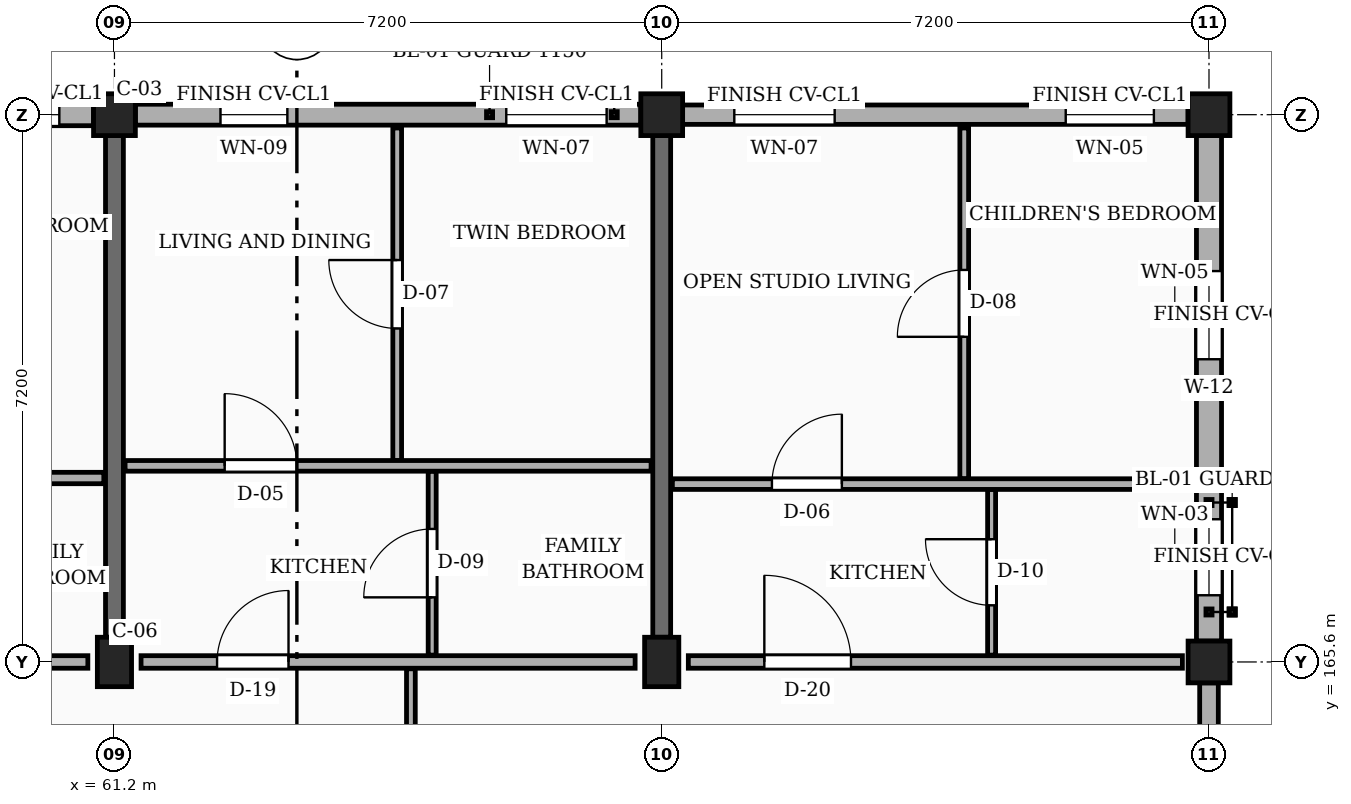
"""IFC4 building model, lengths in metres.
Left out: names, types, materials, properties, quantities, classifications, styles, units other than length and angle.
Written with IfcOpenShell. Run it as: python <this file> out.ifc"""

import sys

from ifc_helpers import new_model, si_unit, direction, frame, frame_2d, origin, origin_2d, place, context, subcontext, project, spatial, rectangle, extrude, element, fill, save


model = new_model("IFC4")
c1 = context("Model", 3, precision=1e-05, world=origin(), true_north=direction((0.0, 1.0)))
c2 = subcontext(c1, "Body", "Model", "MODEL_VIEW")
j1 = project(units=[si_unit("LENGTHUNIT", "METRE"), si_unit("PLANEANGLEUNIT", "RADIAN")], contexts=[c1])
p1 = place(None, origin())
s1 = spatial("IfcSite", under=j1, at=p1, CompositionType="ELEMENT")
p2 = place(p1, origin())
s2 = spatial("IfcBuilding", under=s1, at=p2, CompositionType="ELEMENT")
p3 = place(p2, frame((0.0, 0.0, 13.95)))
s3 = spatial("IfcBuildingStorey", under=s2, at=p3, CompositionType="ELEMENT", Elevation=13.95)
p4 = place(p3, frame((61.2, 165.6, 0.0), z_axis=(0.0, 0.0, 1.0), x_axis=(1.0, 0.0, 0.0)))
e1 = element("IfcColumn", 1, at=p4, inside=s3, PredefinedType="COLUMN", context=c2, shape_type="SweptSolid", body=[
    extrude(rectangle(XDim=0.45, YDim=0.65, at=origin_2d()), origin(), (0.0, 0.0, 1.0), 3.15),
])
p5 = place(p3, frame((61.2, 172.8, 0.0), z_axis=(0.0, 0.0, 1.0), x_axis=(1.0, 0.0, 0.0)))
e2 = element("IfcColumn", 2, at=p5, inside=s3, PredefinedType="COLUMN", context=c2, shape_type="SweptSolid", body=[
    extrude(rectangle(XDim=0.55, YDim=0.55, at=origin_2d()), origin(), (0.0, 0.0, 1.0), 3.15),
])
p6 = place(p3, frame((68.4, 165.6, 0.0), z_axis=(0.0, 0.0, 1.0), x_axis=(1.0, 0.0, 0.0)))
e3 = element("IfcColumn", 3, at=p6, inside=s3, PredefinedType="COLUMN", context=c2, shape_type="SweptSolid", body=[
    extrude(rectangle(XDim=0.45, YDim=0.65, at=origin_2d()), origin(), (0.0, 0.0, 1.0), 3.15),
])
for number, where, z_axis, x_axis in (
    (4, (68.4, 172.8, 0.0), (0.0, 0.0, 1.0), (1.0, 0.0, 0.0)),
    (5, (75.6, 165.6, 0.0), (0.0, 0.0, 1.0), (1.0, 0.0, 0.0)),
    (6, (75.6, 172.8, 0.0), (0.0, 0.0, 1.0), (1.0, 0.0, 0.0)),
):
    element("IfcColumn", number, at=place(p3, frame(where, z_axis=z_axis, x_axis=x_axis)), inside=s3, PredefinedType="COLUMN", context=c2, shape_type="SweptSolid", body=[
        extrude(rectangle(XDim=0.55, YDim=0.55, at=origin_2d()), origin(), (0.0, 0.0, 1.0), 3.15),
    ])
for number, where, z_axis, x_axis in (
    (7, (61.2, 165.925, 0.0), (0.0, 0.0, 1.0), (0.0, 1.0, 0.0)),
    (8, (68.4, 165.925, 0.0), (0.0, 0.0, 1.0), (0.0, 1.0, 0.0)),
):
    element("IfcWall", number, at=place(p3, frame(where, z_axis=z_axis, x_axis=x_axis)), inside=s3, PredefinedType="SOLIDWALL", context=c2, shape_type="SweptSolid", body=[
        extrude(rectangle(XDim=6.6, YDim=0.235, at=frame_2d((3.3, 0.0))), origin(), (0.0, 0.0, 1.0), 2.185),
    ])
p7 = place(p3, frame((75.6, 158.675, 0.0), z_axis=(0.0, 0.0, 1.0), x_axis=(0.0, 1.0, 0.0)))
e9 = element("IfcWall", 9, at=p7, inside=s3, PredefinedType="SOLIDWALL", context=c2, shape_type="SweptSolid", body=[
    extrude(rectangle(XDim=6.65, YDim=0.245, at=frame_2d((3.325, 0.0))), origin(), (0.0, 0.0, 1.0), 2.455),
])
p8 = place(p7, frame((0.45, 0.0, 0.78)))
e10 = element("IfcOpeningElement", 10, at=p8, cuts=e9, PredefinedType="OPENING", context=c2, shape_type="SweptSolid", body=[
    extrude(rectangle(XDim=0.85, YDim=1.15, at=frame_2d((0.425, 0.575))), frame((0.0, 0.133, 0.0), z_axis=(0.0, -1.0, 0.0), x_axis=(1.0, 0.0, 0.0)), (0.0, 0.0, 1.0), 0.265),
])
p9 = place(p7, frame((4.65, 0.0, 0.78)))
e11 = element("IfcOpeningElement", 11, at=p9, cuts=e9, PredefinedType="OPENING", context=c2, shape_type="SweptSolid", body=[
    extrude(rectangle(XDim=1.0, YDim=1.15, at=frame_2d((0.5, 0.575))), frame((0.0, 0.133, 0.0), z_axis=(0.0, -1.0, 0.0), x_axis=(1.0, 0.0, 0.0)), (0.0, 0.0, 1.0), 0.265),
])
p10 = place(p3, frame((75.6, 165.875, 0.0), z_axis=(0.0, 0.0, 1.0), x_axis=(0.0, 1.0, 0.0)))
e12 = element("IfcWall", 12, at=p10, inside=s3, PredefinedType="SOLIDWALL", context=c2, shape_type="SweptSolid", body=[
    extrude(rectangle(XDim=6.65, YDim=0.33, at=frame_2d((3.325, 0.0))), origin(), (0.0, 0.0, 1.0), 2.455),
])
p11 = place(p10, frame((0.603, 0.0, 0.78)))
e13 = element("IfcOpeningElement", 13, at=p11, cuts=e12, PredefinedType="OPENING", context=c2, shape_type="SweptSolid", body=[
    extrude(rectangle(XDim=1.0, YDim=1.15, at=frame_2d((0.5, 0.575))), frame((0.0, 0.175, 0.0), z_axis=(0.0, -1.0, 0.0), x_axis=(1.0, 0.0, 0.0)), (0.0, 0.0, 1.0), 0.35),
])
p12 = place(p10, frame((3.708, 0.0, 0.78)))
e14 = element("IfcOpeningElement", 14, at=p12, cuts=e12, PredefinedType="OPENING", context=c2, shape_type="SweptSolid", body=[
    extrude(rectangle(XDim=1.16, YDim=1.15, at=frame_2d((0.58, 0.575))), frame((0.0, 0.175, 0.0), z_axis=(0.0, -1.0, 0.0), x_axis=(1.0, 0.0, 0.0)), (0.0, 0.0, 1.0), 0.35),
])
p13 = place(p3, frame((75.325, 172.8, 0.0), z_axis=(0.0, 0.0, 1.0), x_axis=(-1.0, 0.0, 0.0)))
e15 = element("IfcWall", 15, at=p13, inside=s3, PredefinedType="SOLIDWALL", context=c2, shape_type="SweptSolid", body=[
    extrude(rectangle(XDim=6.65, YDim=0.255, at=frame_2d((3.325, 0.0))), origin(), (0.0, 0.0, 1.0), 2.455),
])
p14 = place(p13, frame((0.45, 0.0, 0.78)))
e16 = element("IfcOpeningElement", 16, at=p14, cuts=e15, PredefinedType="OPENING", context=c2, shape_type="SweptSolid", body=[
    extrude(rectangle(XDim=1.16, YDim=1.15, at=frame_2d((0.58, 0.575))), frame((0.0, 0.137, 0.0), z_axis=(0.0, -1.0, 0.0), x_axis=(1.0, 0.0, 0.0)), (0.0, 0.0, 1.0), 0.275),
])
p15 = place(p13, frame((4.65, 0.0, 0.78)))
e17 = element("IfcOpeningElement", 17, at=p15, cuts=e15, PredefinedType="OPENING", context=c2, shape_type="SweptSolid", body=[
    extrude(rectangle(XDim=1.32, YDim=1.15, at=frame_2d((0.66, 0.575))), frame((0.0, 0.137, 0.0), z_axis=(0.0, -1.0, 0.0), x_axis=(1.0, 0.0, 0.0)), (0.0, 0.0, 1.0), 0.275),
])
p16 = place(p3, frame((68.125, 172.8, 0.0), z_axis=(0.0, 0.0, 1.0), x_axis=(-1.0, 0.0, 0.0)))
e18 = element("IfcWall", 18, at=p16, inside=s3, PredefinedType="SOLIDWALL", context=c2, shape_type="SweptSolid", body=[
    extrude(rectangle(XDim=6.65, YDim=0.275, at=frame_2d((3.325, 0.0))), origin(), (0.0, 0.0, 1.0), 2.455),
])
p17 = place(p16, frame((0.45, 0.0, 0.78)))
e19 = element("IfcOpeningElement", 19, at=p17, cuts=e18, PredefinedType="OPENING", context=c2, shape_type="SweptSolid", body=[
    extrude(rectangle(XDim=1.32, YDim=1.15, at=frame_2d((0.66, 0.575))), frame((0.0, 0.147, 0.0), z_axis=(0.0, -1.0, 0.0), x_axis=(1.0, 0.0, 0.0)), (0.0, 0.0, 1.0), 0.295),
])
p18 = place(p16, frame((4.65, 0.0, 0.78)))
e20 = element("IfcOpeningElement", 20, at=p18, cuts=e18, PredefinedType="OPENING", context=c2, shape_type="SweptSolid", body=[
    extrude(rectangle(XDim=0.88, YDim=1.26, at=frame_2d((0.44, 0.63))), frame((0.0, 0.147, 0.0), z_axis=(0.0, -1.0, 0.0), x_axis=(1.0, 0.0, 0.0)), (0.0, 0.0, 1.0), 0.295),
])
p19 = place(p3, frame((60.925, 172.8, 0.0), z_axis=(0.0, 0.0, 1.0), x_axis=(-1.0, 0.0, 0.0)))
e21 = element("IfcWall", 21, at=p19, inside=s3, PredefinedType="SOLIDWALL", context=c2, shape_type="SweptSolid", body=[
    extrude(rectangle(XDim=6.65, YDim=0.29, at=frame_2d((3.325, 0.0))), origin(), (0.0, 0.0, 1.0), 2.455),
])
p20 = place(p19, frame((0.45, 0.0, 0.78)))
e22 = element("IfcOpeningElement", 22, at=p20, cuts=e21, PredefinedType="OPENING", context=c2, shape_type="SweptSolid", body=[
    extrude(rectangle(XDim=0.88, YDim=1.26, at=frame_2d((0.44, 0.63))), frame((0.0, 0.155, 0.0), z_axis=(0.0, -1.0, 0.0), x_axis=(1.0, 0.0, 0.0)), (0.0, 0.0, 1.0), 0.31),
])
p21 = place(p19, frame((4.65, 0.0, 0.78)))
e23 = element("IfcOpeningElement", 23, at=p21, cuts=e21, PredefinedType="OPENING", context=c2, shape_type="SweptSolid", body=[
    extrude(rectangle(XDim=1.04, YDim=1.26, at=frame_2d((0.52, 0.63))), frame((0.0, 0.155, 0.0), z_axis=(0.0, -1.0, 0.0), x_axis=(1.0, 0.0, 0.0)), (0.0, 0.0, 1.0), 0.31),
])
p22 = place(p3, frame((54.35, 165.6, 0.0), z_axis=(0.0, 0.0, 1.0), x_axis=(1.0, 0.0, 0.0)))
e24 = element("IfcWall", 24, at=p22, inside=s3, PredefinedType="PARTITIONING", context=c2, shape_type="SweptSolid", body=[
    extrude(rectangle(XDim=6.5, YDim=0.165, at=frame_2d((3.25, 0.0))), origin(), (0.0, 0.0, 1.0), 2.235),
])
p23 = place(p22, frame((1.0, 0.0, 0.0)))
e25 = element("IfcOpeningElement", 25, at=p23, cuts=e24, PredefinedType="OPENING", context=c2, shape_type="SweptSolid", body=[
    extrude(rectangle(XDim=1.0, YDim=2.15, at=frame_2d((0.5, 1.075))), frame((0.0, 0.093, 0.0), z_axis=(0.0, -1.0, 0.0), x_axis=(1.0, 0.0, 0.0)), (0.0, 0.0, 1.0), 0.185),
])
p24 = place(p3, frame((61.55, 165.6, 0.0), z_axis=(0.0, 0.0, 1.0), x_axis=(1.0, 0.0, 0.0)))
e26 = element("IfcWall", 26, at=p24, inside=s3, PredefinedType="PARTITIONING", context=c2, shape_type="SweptSolid", body=[
    extrude(rectangle(XDim=6.5, YDim=0.165, at=frame_2d((3.25, 0.0))), origin(), (0.0, 0.0, 1.0), 2.235),
])
p25 = place(p24, frame((1.0, 0.0, 0.0)))
e27 = element("IfcOpeningElement", 27, at=p25, cuts=e26, PredefinedType="OPENING", context=c2, shape_type="SweptSolid", body=[
    extrude(rectangle(XDim=0.94, YDim=2.12, at=frame_2d((0.47, 1.06))), frame((0.0, 0.093, 0.0), z_axis=(0.0, -1.0, 0.0), x_axis=(1.0, 0.0, 0.0)), (0.0, 0.0, 1.0), 0.185),
])
p26 = place(p3, frame((68.75, 165.6, 0.0), z_axis=(0.0, 0.0, 1.0), x_axis=(1.0, 0.0, 0.0)))
e28 = element("IfcWall", 28, at=p26, inside=s3, PredefinedType="PARTITIONING", context=c2, shape_type="SweptSolid", body=[
    extrude(rectangle(XDim=6.5, YDim=0.165, at=frame_2d((3.25, 0.0))), origin(), (0.0, 0.0, 1.0), 2.235),
])
p27 = place(p26, frame((1.0, 0.0, 0.0)))
e29 = element("IfcOpeningElement", 29, at=p27, cuts=e28, PredefinedType="OPENING", context=c2, shape_type="SweptSolid", body=[
    extrude(rectangle(XDim=1.14, YDim=2.18, at=frame_2d((0.57, 1.09))), frame((0.0, 0.093, 0.0), z_axis=(0.0, -1.0, 0.0), x_axis=(1.0, 0.0, 0.0)), (0.0, 0.0, 1.0), 0.185),
])
p28 = place(p3, frame((54.14, 168.02, 0.0), z_axis=(0.0, 0.0, 1.0), x_axis=(1.0, 0.0, 0.0)))
e30 = element("IfcWall", 30, at=p28, inside=s3, PredefinedType="PARTITIONING", context=c2, shape_type="SweptSolid", body=[
    extrude(rectangle(XDim=6.92, YDim=0.15, at=frame_2d((3.46, 0.0))), origin(), (0.0, 0.0, 1.0), 2.32),
])
p29 = place(p28, frame((1.31, 0.0, 0.0)))
e31 = element("IfcOpeningElement", 31, at=p29, cuts=e30, PredefinedType="OPENING", context=c2, shape_type="SweptSolid", body=[
    extrude(rectangle(XDim=0.92, YDim=2.1, at=frame_2d((0.46, 1.05))), frame((0.0, 0.085, 0.0), z_axis=(0.0, -1.0, 0.0), x_axis=(1.0, 0.0, 0.0)), (0.0, 0.0, 1.0), 0.17),
])
p30 = place(p3, frame((65.1, 158.49, 0.0), z_axis=(0.0, 0.0, 1.0), x_axis=(0.0, 1.0, 0.0)))
e32 = element("IfcWall", 32, at=p30, inside=s3, PredefinedType="PARTITIONING", context=c2, shape_type="SweptSolid", body=[
    extrude(rectangle(XDim=7.02, YDim=0.115, at=frame_2d((3.51, 0.0))), origin(), (0.0, 0.0, 1.0), 2.32),
])
p31 = place(p30, frame((2.85, 0.0, 0.0)))
e33 = element("IfcOpeningElement", 33, at=p31, cuts=e32, PredefinedType="OPENING", context=c2, shape_type="SweptSolid", body=[
    extrude(rectangle(XDim=1.02, YDim=2.15, at=frame_2d((0.51, 1.075))), frame((0.0, 0.067, 0.0), z_axis=(0.0, -1.0, 0.0), x_axis=(1.0, 0.0, 0.0)), (0.0, 0.0, 1.0), 0.135),
])
p32 = place(p3, frame((64.92, 168.25, 0.0), z_axis=(0.0, 0.0, 1.0), x_axis=(0.0, 1.0, 0.0)))
e34 = element("IfcWall", 34, at=p32, inside=s3, PredefinedType="PARTITIONING", context=c2, shape_type="SweptSolid", body=[
    extrude(rectangle(XDim=4.375, YDim=0.115, at=frame_2d((2.188, 0.0))), origin(), (0.0, 0.0, 1.0), 2.32),
])
p33 = place(p32, frame((1.738, 0.0, 0.0)))
e35 = element("IfcOpeningElement", 35, at=p33, cuts=e34, PredefinedType="OPENING", context=c2, shape_type="SweptSolid", body=[
    extrude(rectangle(XDim=0.9, YDim=2.1, at=frame_2d((0.45, 1.05))), frame((0.0, 0.067, 0.0), z_axis=(0.0, -1.0, 0.0), x_axis=(1.0, 0.0, 0.0)), (0.0, 0.0, 1.0), 0.135),
])
p34 = place(p3, frame((65.38, 165.69, 0.0), z_axis=(0.0, 0.0, 1.0), x_axis=(0.0, 1.0, 0.0)))
e36 = element("IfcWall", 36, at=p34, inside=s3, PredefinedType="PARTITIONING", context=c2, shape_type="SweptSolid", body=[
    extrude(rectangle(XDim=2.42, YDim=0.105, at=frame_2d((1.21, 0.0))), origin(), (0.0, 0.0, 1.0), 2.32),
])
p35 = place(p34, frame((0.76, 0.0, 0.0)))
e37 = element("IfcOpeningElement", 37, at=p35, cuts=e36, PredefinedType="OPENING", context=c2, shape_type="SweptSolid", body=[
    extrude(rectangle(XDim=0.9, YDim=2.05, at=frame_2d((0.45, 1.025))), frame((0.0, 0.062, 0.0), z_axis=(0.0, -1.0, 0.0), x_axis=(1.0, 0.0, 0.0)), (0.0, 0.0, 1.0), 0.125),
])
p36 = place(p3, frame((61.34, 168.18, 0.0), z_axis=(0.0, 0.0, 1.0), x_axis=(1.0, 0.0, 0.0)))
e38 = element("IfcWall", 38, at=p36, inside=s3, PredefinedType="PARTITIONING", context=c2, shape_type="SweptSolid", body=[
    extrude(rectangle(XDim=6.92, YDim=0.14, at=frame_2d((3.46, 0.0))), origin(), (0.0, 0.0, 1.0), 2.32),
])
p37 = place(p36, frame((1.31, 0.0, 0.0)))
e39 = element("IfcOpeningElement", 39, at=p37, cuts=e38, PredefinedType="OPENING", context=c2, shape_type="SweptSolid", body=[
    extrude(rectangle(XDim=0.95, YDim=2.1, at=frame_2d((0.475, 1.05))), frame((0.0, 0.08, 0.0), z_axis=(0.0, -1.0, 0.0), x_axis=(1.0, 0.0, 0.0)), (0.0, 0.0, 1.0), 0.16),
])
p38 = place(p3, frame((72.38, 168.01, 0.0), z_axis=(0.0, 0.0, 1.0), x_axis=(0.0, 1.0, 0.0)))
e40 = element("IfcWall", 40, at=p38, inside=s3, PredefinedType="PARTITIONING", context=c2, shape_type="SweptSolid", body=[
    extrude(rectangle(XDim=4.615, YDim=0.115, at=frame_2d((2.308, 0.0))), origin(), (0.0, 0.0, 1.0), 2.32),
])
p39 = place(p38, frame((1.867, 0.0, 0.0)))
e41 = element("IfcOpeningElement", 41, at=p39, cuts=e40, PredefinedType="OPENING", context=c2, shape_type="SweptSolid", body=[
    extrude(rectangle(XDim=0.88, YDim=2.08, at=frame_2d((0.44, 1.04))), frame((0.0, 0.067, 0.0), z_axis=(0.0, -1.0, 0.0), x_axis=(1.0, 0.0, 0.0)), (0.0, 0.0, 1.0), 0.135),
])
p40 = place(p3, frame((72.74, 165.69, 0.0), z_axis=(0.0, 0.0, 1.0), x_axis=(0.0, 1.0, 0.0)))
e42 = element("IfcWall", 42, at=p40, inside=s3, PredefinedType="PARTITIONING", context=c2, shape_type="SweptSolid", body=[
    extrude(rectangle(XDim=2.18, YDim=0.105, at=frame_2d((1.09, 0.0))), origin(), (0.0, 0.0, 1.0), 2.32),
])
p41 = place(p40, frame((0.655, 0.0, 0.0)))
e43 = element("IfcOpeningElement", 43, at=p41, cuts=e42, PredefinedType="OPENING", context=c2, shape_type="SweptSolid", body=[
    extrude(rectangle(XDim=0.87, YDim=2.05, at=frame_2d((0.435, 1.025))), frame((0.0, 0.062, 0.0), z_axis=(0.0, -1.0, 0.0), x_axis=(1.0, 0.0, 0.0)), (0.0, 0.0, 1.0), 0.125),
])
p42 = place(p3, frame((68.54, 167.94, 0.0), z_axis=(0.0, 0.0, 1.0), x_axis=(1.0, 0.0, 0.0)))
e44 = element("IfcWall", 44, at=p42, inside=s3, PredefinedType="PARTITIONING", context=c2, shape_type="SweptSolid", body=[
    extrude(rectangle(XDim=6.885, YDim=0.14, at=frame_2d((3.442, 0.0))), origin(), (0.0, 0.0, 1.0), 2.32),
])
p43 = place(p42, frame((1.31, 0.0, 0.0)))
e45 = element("IfcOpeningElement", 45, at=p43, cuts=e44, PredefinedType="OPENING", context=c2, shape_type="SweptSolid", body=[
    extrude(rectangle(XDim=0.92, YDim=2.1, at=frame_2d((0.46, 1.05))), frame((0.0, 0.08, 0.0), z_axis=(0.0, -1.0, 0.0), x_axis=(1.0, 0.0, 0.0)), (0.0, 0.0, 1.0), 0.16),
])
p44 = place(p11, origin())
e46 = element("IfcWindow", 46, at=p44, inside=s3, PartitioningType="SINGLE_PANEL", PredefinedType="WINDOW", context=c2, shape_type="SweptSolid", body=[
    extrude(rectangle(XDim=1.0, YDim=1.15, at=frame_2d((0.5, 0.575))), frame((0.0, 0.03, 0.0), z_axis=(0.0, -1.0, 0.0), x_axis=(1.0, 0.0, 0.0)), (0.0, 0.0, 1.0), 0.06),
])
fill(e13, e46)
p45 = place(p12, origin())
e47 = element("IfcWindow", 47, at=p45, inside=s3, PartitioningType="SINGLE_PANEL", PredefinedType="WINDOW", context=c2, shape_type="SweptSolid", body=[
    extrude(rectangle(XDim=1.16, YDim=1.15, at=frame_2d((0.58, 0.575))), frame((0.0, 0.03, 0.0), z_axis=(0.0, -1.0, 0.0), x_axis=(1.0, 0.0, 0.0)), (0.0, 0.0, 1.0), 0.06),
])
fill(e14, e47)
p46 = place(p14, origin())
e48 = element("IfcWindow", 48, at=p46, inside=s3, PartitioningType="SINGLE_PANEL", PredefinedType="WINDOW", context=c2, shape_type="SweptSolid", body=[
    extrude(rectangle(XDim=1.16, YDim=1.15, at=frame_2d((0.58, 0.575))), frame((0.0, 0.03, 0.0), z_axis=(0.0, -1.0, 0.0), x_axis=(1.0, 0.0, 0.0)), (0.0, 0.0, 1.0), 0.06),
])
fill(e16, e48)
p47 = place(p15, origin())
e49 = element("IfcWindow", 49, at=p47, inside=s3, PartitioningType="SINGLE_PANEL", PredefinedType="WINDOW", context=c2, shape_type="SweptSolid", body=[
    extrude(rectangle(XDim=1.32, YDim=1.15, at=frame_2d((0.66, 0.575))), frame((0.0, 0.03, 0.0), z_axis=(0.0, -1.0, 0.0), x_axis=(1.0, 0.0, 0.0)), (0.0, 0.0, 1.0), 0.06),
])
fill(e17, e49)
p48 = place(p17, origin())
e50 = element("IfcWindow", 50, at=p48, inside=s3, PartitioningType="SINGLE_PANEL", PredefinedType="WINDOW", context=c2, shape_type="SweptSolid", body=[
    extrude(rectangle(XDim=1.32, YDim=1.15, at=frame_2d((0.66, 0.575))), frame((0.0, 0.03, 0.0), z_axis=(0.0, -1.0, 0.0), x_axis=(1.0, 0.0, 0.0)), (0.0, 0.0, 1.0), 0.06),
])
fill(e19, e50)
p49 = place(p18, origin())
e51 = element("IfcWindow", 51, at=p49, inside=s3, PartitioningType="SINGLE_PANEL", PredefinedType="WINDOW", context=c2, shape_type="SweptSolid", body=[
    extrude(rectangle(XDim=0.88, YDim=1.26, at=frame_2d((0.44, 0.63))), frame((0.0, 0.03, 0.0), z_axis=(0.0, -1.0, 0.0), x_axis=(1.0, 0.0, 0.0)), (0.0, 0.0, 1.0), 0.06),
])
fill(e20, e51)
p50 = place(p20, origin())
e52 = element("IfcWindow", 52, at=p50, inside=s3, PartitioningType="SINGLE_PANEL", PredefinedType="WINDOW", context=c2, shape_type="SweptSolid", body=[
    extrude(rectangle(XDim=0.88, YDim=1.26, at=frame_2d((0.44, 0.63))), frame((0.0, 0.03, 0.0), z_axis=(0.0, -1.0, 0.0), x_axis=(1.0, 0.0, 0.0)), (0.0, 0.0, 1.0), 0.06),
])
fill(e22, e52)
p51 = place(p25, origin())
e53 = element("IfcDoor", 53, at=p51, inside=s3, OperationType="SINGLE_SWING_RIGHT", PredefinedType="DOOR", context=c2, shape_type="SweptSolid", body=[
    extrude(rectangle(XDim=0.94, YDim=2.12, at=frame_2d((0.47, 1.06))), frame((0.0, 0.025, 0.0), z_axis=(0.0, -1.0, 0.0), x_axis=(1.0, 0.0, 0.0)), (0.0, 0.0, 1.0), 0.05),
])
fill(e27, e53)
p52 = place(p27, origin())
e54 = element("IfcDoor", 54, at=p52, inside=s3, OperationType="SINGLE_SWING_LEFT", PredefinedType="DOOR", context=c2, shape_type="SweptSolid", body=[
    extrude(rectangle(XDim=1.14, YDim=2.18, at=frame_2d((0.57, 1.09))), frame((0.0, 0.025, 0.0), z_axis=(0.0, -1.0, 0.0), x_axis=(1.0, 0.0, 0.0)), (0.0, 0.0, 1.0), 0.05),
])
fill(e29, e54)
p53 = place(p33, origin())
e55 = element("IfcDoor", 55, at=p53, inside=s3, OperationType="SINGLE_SWING_RIGHT", PredefinedType="DOOR", context=c2, shape_type="SweptSolid", body=[
    extrude(rectangle(XDim=0.9, YDim=2.1, at=frame_2d((0.45, 1.05))), frame((0.0, 0.025, 0.0), z_axis=(0.0, -1.0, 0.0), x_axis=(1.0, 0.0, 0.0)), (0.0, 0.0, 1.0), 0.05),
])
fill(e35, e55)
p54 = place(p35, origin())
e56 = element("IfcDoor", 56, at=p54, inside=s3, OperationType="SINGLE_SWING_LEFT", PredefinedType="DOOR", context=c2, shape_type="SweptSolid", body=[
    extrude(rectangle(XDim=0.9, YDim=2.05, at=frame_2d((0.45, 1.025))), frame((0.0, 0.025, 0.0), z_axis=(0.0, -1.0, 0.0), x_axis=(1.0, 0.0, 0.0)), (0.0, 0.0, 1.0), 0.05),
])
fill(e37, e56)
p55 = place(p37, origin())
e57 = element("IfcDoor", 57, at=p55, inside=s3, OperationType="SINGLE_SWING_LEFT", PredefinedType="DOOR", context=c2, shape_type="SweptSolid", body=[
    extrude(rectangle(XDim=0.95, YDim=2.1, at=frame_2d((0.475, 1.05))), frame((0.0, 0.025, 0.0), z_axis=(0.0, -1.0, 0.0), x_axis=(1.0, 0.0, 0.0)), (0.0, 0.0, 1.0), 0.05),
])
fill(e39, e57)
p56 = place(p39, origin())
e58 = element("IfcDoor", 58, at=p56, inside=s3, OperationType="SINGLE_SWING_LEFT", PredefinedType="DOOR", context=c2, shape_type="SweptSolid", body=[
    extrude(rectangle(XDim=0.88, YDim=2.08, at=frame_2d((0.44, 1.04))), frame((0.0, 0.025, 0.0), z_axis=(0.0, -1.0, 0.0), x_axis=(1.0, 0.0, 0.0)), (0.0, 0.0, 1.0), 0.05),
])
fill(e41, e58)
p57 = place(p41, origin())
e59 = element("IfcDoor", 59, at=p57, inside=s3, OperationType="SINGLE_SWING_RIGHT", PredefinedType="DOOR", context=c2, shape_type="SweptSolid", body=[
    extrude(rectangle(XDim=0.87, YDim=2.05, at=frame_2d((0.435, 1.025))), frame((0.0, 0.025, 0.0), z_axis=(0.0, -1.0, 0.0), x_axis=(1.0, 0.0, 0.0)), (0.0, 0.0, 1.0), 0.05),
])
fill(e43, e59)
p58 = place(p43, origin())
e60 = element("IfcDoor", 60, at=p58, inside=s3, OperationType="SINGLE_SWING_RIGHT", PredefinedType="DOOR", context=c2, shape_type="SweptSolid", body=[
    extrude(rectangle(XDim=0.92, YDim=2.1, at=frame_2d((0.46, 1.05))), frame((0.0, 0.025, 0.0), z_axis=(0.0, -1.0, 0.0), x_axis=(1.0, 0.0, 0.0)), (0.0, 0.0, 1.0), 0.05),
])
fill(e45, e60)
save(model, sys.argv[1])
